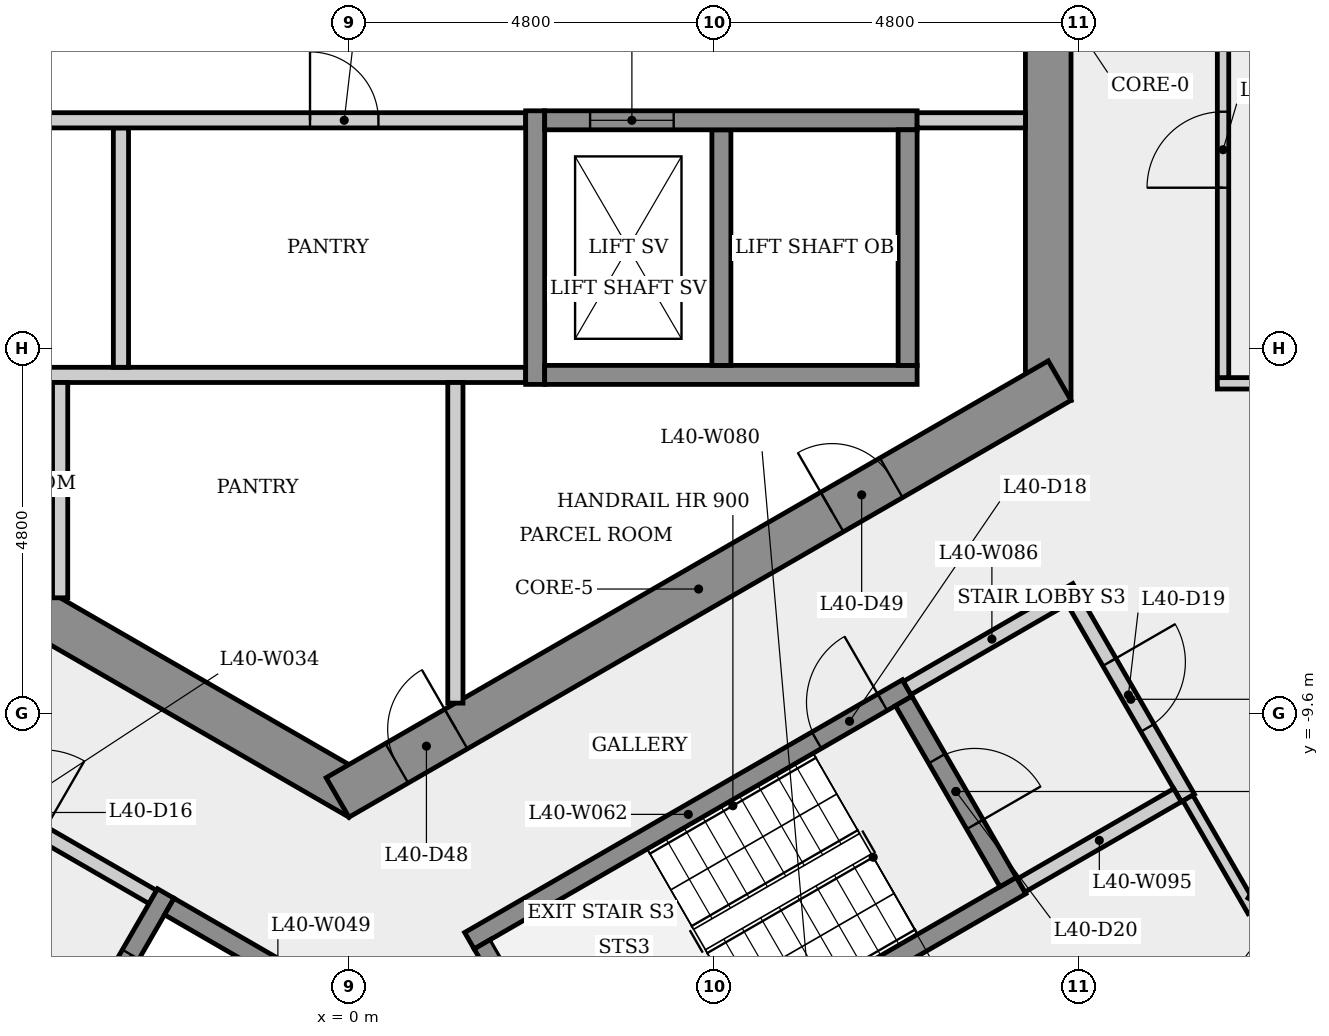
"""IFC4 building model, lengths in metres.
Left out: names, types, materials, properties, quantities, classifications, styles, units other than length and angle.
Written with IfcOpenShell. Run it as: python <this file> out.ifc"""

import sys

from ifc_helpers import new_model, si_unit, direction, frame, frame_2d, origin, place, context, subcontext, project, spatial, rectangle, extrude, element, fill, save


model = new_model("IFC4")
c1 = context("Model", 3, precision=1e-05, world=origin(), true_north=direction((0.0, 1.0)))
c2 = subcontext(c1, "Body", "Model", "MODEL_VIEW")
j1 = project(units=[si_unit("LENGTHUNIT", "METRE"), si_unit("PLANEANGLEUNIT", "RADIAN")], contexts=[c1])
p1 = place(None, origin())
s1 = spatial("IfcSite", under=j1, at=p1, CompositionType="ELEMENT")
p2 = place(p1, origin())
s2 = spatial("IfcBuilding", under=s1, at=p2, CompositionType="ELEMENT")
p3 = place(p2, frame((0.0, 0.0, 152.7)))
s3 = spatial("IfcBuildingStorey", under=s2, at=p3, CompositionType="ELEMENT", Elevation=152.7)
p4 = place(p3, frame((9.2, -5.485, 0.0), z_axis=(0.0, 0.0, 1.0), x_axis=(0.0, 1.0, 0.0)))
e1 = element("IfcWall", 1, at=p4, inside=s3, PredefinedType="SHEAR", context=c2, shape_type="SweptSolid", body=[
    extrude(rectangle(XDim=10.97, YDim=0.6, at=frame_2d((5.485, 0.0))), origin(), (0.0, 0.0, 1.0), 3.4),
])
p5 = place(p4, frame((4.685, 0.0, 0.0)))
e2 = element("IfcOpeningElement", 2, at=p5, cuts=e1, PredefinedType="OPENING", context=c2, shape_type="SweptSolid", body=[
    extrude(rectangle(XDim=1.6, YDim=2.1, at=frame_2d((0.8, 1.05))), frame((0.0, 0.31, 0.0), z_axis=(0.0, -1.0, 0.0), x_axis=(1.0, 0.0, 0.0)), (0.0, 0.0, 1.0), 0.62),
])
p6 = place(p3, frame((-9.35, -5.225, 0.0), z_axis=(0.0, 0.0, 1.0), x_axis=(0.866023993627, -0.500002442456, 0.0)))
e3 = element("IfcWall", 3, at=p6, inside=s3, PredefinedType="SHEAR", context=c2, shape_type="SweptSolid", body=[
    extrude(rectangle(XDim=10.97, YDim=0.6, at=frame_2d((5.485, 0.0))), origin(), (0.0, 0.0, 1.0), 3.4),
])
p7 = place(p6, frame((2.853, 0.0, 0.0)))
e4 = element("IfcOpeningElement", 4, at=p7, cuts=e3, PredefinedType="OPENING", context=c2, shape_type="SweptSolid", body=[
    extrude(rectangle(XDim=0.9, YDim=2.1, at=frame_2d((0.45, 1.05))), frame((0.0, 0.31, 0.0), z_axis=(0.0, -1.0, 0.0), x_axis=(1.0, 0.0, 0.0)), (0.0, 0.0, 1.0), 0.62),
])
p8 = place(p3, frame((-0.15, -10.71, 0.0), z_axis=(0.0, 0.0, 1.0), x_axis=(0.866023993627, 0.500002442456, 0.0)))
e5 = element("IfcWall", 5, at=p8, inside=s3, PredefinedType="SHEAR", context=c2, shape_type="SweptSolid", body=[
    extrude(rectangle(XDim=10.97, YDim=0.6, at=frame_2d((5.485, 0.0))), origin(), (0.0, 0.0, 1.0), 3.4),
])
p9 = place(p8, frame((0.9, 0.0, 0.0)))
e6 = element("IfcOpeningElement", 6, at=p9, cuts=e5, PredefinedType="OPENING", context=c2, shape_type="SweptSolid", body=[
    extrude(rectangle(XDim=0.9, YDim=2.1, at=frame_2d((0.45, 1.05))), frame((0.0, 0.31, 0.0), z_axis=(0.0, -1.0, 0.0), x_axis=(1.0, 0.0, 0.0)), (0.0, 0.0, 1.0), 0.62),
])
p10 = place(p8, frame((7.512, 0.0, 0.0)))
e7 = element("IfcOpeningElement", 7, at=p10, cuts=e5, PredefinedType="OPENING", context=c2, shape_type="SweptSolid", body=[
    extrude(rectangle(XDim=0.9, YDim=2.1, at=frame_2d((0.45, 1.05))), frame((0.0, 0.31, 0.0), z_axis=(0.0, -1.0, 0.0), x_axis=(1.0, 0.0, 0.0)), (0.0, 0.0, 1.0), 0.62),
])
p11 = place(p3, frame((-8.88, -5.15, 0.0), z_axis=(0.0, 0.0, 1.0), x_axis=(1.0, 0.0, 0.0)))
e8 = element("IfcWall", 8, at=p11, inside=s3, PredefinedType="PARTITIONING", context=c2, shape_type="SweptSolid", body=[
    extrude(rectangle(XDim=11.205, YDim=0.2, at=frame_2d((5.603, 0.0))), origin(), (0.0, 0.0, 1.0), 3.05),
])
p12 = place(p3, frame((-6.435, -9.795, 0.0), z_axis=(0.0, 0.0, 1.0), x_axis=(0.866012907634, -0.500021643343, 0.0)))
e9 = element("IfcWall", 9, at=p12, inside=s3, PredefinedType="PARTITIONING", context=c2, shape_type="SweptSolid", body=[
    extrude(rectangle(XDim=4.45, YDim=0.2, at=frame_2d((2.225, 0.0))), origin(), (0.0, 0.0, 1.0), 3.05),
])
p13 = place(p12, frame((1.675, 0.0, 0.0)))
e10 = element("IfcOpeningElement", 10, at=p13, cuts=e9, PredefinedType="OPENING", context=c2, shape_type="SweptSolid", body=[
    extrude(rectangle(XDim=1.1, YDim=2.1, at=frame_2d((0.55, 1.05))), frame((0.0, 0.11, 0.0), z_axis=(0.0, -1.0, 0.0), x_axis=(1.0, 0.0, 0.0)), (0.0, 0.0, 1.0), 0.22),
])
p14 = place(p3, frame((-3.8, -5.25, 0.0), z_axis=(0.0, 0.0, 1.0), x_axis=(0.0, -1.0, 0.0)))
e11 = element("IfcWall", 11, at=p14, inside=s3, PredefinedType="PARTITIONING", context=c2, shape_type="SweptSolid", body=[
    extrude(rectangle(XDim=2.833, YDim=0.2, at=frame_2d((1.417, 0.0))), origin(), (0.0, 0.0, 1.0), 3.05),
])
p15 = place(p3, frame((-3.0, -1.9, 0.0), z_axis=(0.0, 0.0, 1.0), x_axis=(0.0, -1.0, 0.0)))
e12 = element("IfcWall", 12, at=p15, inside=s3, PredefinedType="PARTITIONING", context=c2, shape_type="SweptSolid", body=[
    extrude(rectangle(XDim=3.15, YDim=0.2, at=frame_2d((1.575, 0.0))), origin(), (0.0, 0.0, 1.0), 3.05),
])
p16 = place(p3, frame((-8.9, -1.8, 0.0), z_axis=(0.0, 0.0, 1.0), x_axis=(1.0, 0.0, 0.0)))
e13 = element("IfcWall", 13, at=p16, inside=s3, PredefinedType="PARTITIONING", context=c2, shape_type="SweptSolid", body=[
    extrude(rectangle(XDim=11.225, YDim=0.2, at=frame_2d((5.613, 0.0))), origin(), (0.0, 0.0, 1.0), 3.05),
])
p17 = place(p16, frame((2.485, 0.0, 0.0)))
e14 = element("IfcOpeningElement", 14, at=p17, cuts=e13, PredefinedType="OPENING", context=c2, shape_type="SweptSolid", body=[
    extrude(rectangle(XDim=0.9, YDim=2.1, at=frame_2d((0.45, 1.05))), frame((0.0, 0.11, 0.0), z_axis=(0.0, -1.0, 0.0), x_axis=(1.0, 0.0, 0.0)), (0.0, 0.0, 1.0), 0.22),
])
p18 = place(p16, frame((8.387, 0.0, 0.0)))
e15 = element("IfcOpeningElement", 15, at=p18, cuts=e13, PredefinedType="OPENING", context=c2, shape_type="SweptSolid", body=[
    extrude(rectangle(XDim=0.9, YDim=2.1, at=frame_2d((0.45, 1.05))), frame((0.0, 0.11, 0.0), z_axis=(0.0, -1.0, 0.0), x_axis=(1.0, 0.0, 0.0)), (0.0, 0.0, 1.0), 0.22),
])
p19 = place(p3, frame((-2.41, -11.974, 0.0), z_axis=(0.0, 0.0, 1.0), x_axis=(-0.500001826776, -0.866024349092, 0.0)))
e16 = element("IfcWall", 16, at=p19, inside=s3, PredefinedType="SHEAR", context=c2, shape_type="SweptSolid", body=[
    extrude(rectangle(XDim=2.95, YDim=0.25, at=frame_2d((1.475, 0.0))), origin(), (0.0, 0.0, 1.0), 3.05),
])
p20 = place(p19, frame((0.925, 0.0, 0.0)))
e17 = element("IfcOpeningElement", 17, at=p20, cuts=e16, PredefinedType="OPENING", context=c2, shape_type="SweptSolid", body=[
    extrude(rectangle(XDim=1.1, YDim=2.1, at=frame_2d((0.55, 1.05))), frame((0.0, 0.135, 0.0), z_axis=(0.0, -1.0, 0.0), x_axis=(1.0, 0.0, 0.0)), (0.0, 0.0, 1.0), 0.27),
])
p21 = place(p3, frame((-2.364, -12.145, 0.0), z_axis=(0.0, 0.0, 1.0), x_axis=(0.866040211805, -0.499974350878, 0.0)))
e18 = element("IfcWall", 18, at=p21, inside=s3, PredefinedType="SHEAR", context=c2, shape_type="SweptSolid", body=[
    extrude(rectangle(XDim=3.3, YDim=0.25, at=frame_2d((1.65, 0.0))), origin(), (0.0, 0.0, 1.0), 3.05),
])
p22 = place(p3, frame((1.4, -5.25, 0.0), z_axis=(0.0, 0.0, 1.0), x_axis=(0.0, -1.0, 0.0)))
e19 = element("IfcWall", 19, at=p22, inside=s3, PredefinedType="PARTITIONING", context=c2, shape_type="SweptSolid", body=[
    extrude(rectangle(XDim=4.219, YDim=0.2, at=frame_2d((2.109, 0.0))), origin(), (0.0, 0.0, 1.0), 3.05),
])
p23 = place(p3, frame((1.585, -12.595, 0.0), z_axis=(0.0, 0.0, 1.0), x_axis=(0.866036417653, 0.499980922934, 0.0)))
e20 = element("IfcWall", 20, at=p23, inside=s3, PredefinedType="SHEAR", context=c2, shape_type="SweptSolid", body=[
    extrude(rectangle(XDim=6.65, YDim=0.25, at=frame_2d((3.325, 0.0))), origin(), (0.0, 0.0, 1.0), 3.05),
])
p24 = place(p23, frame((5.275, 0.0, 0.0)))
e21 = element("IfcOpeningElement", 21, at=p24, cuts=e20, PredefinedType="OPENING", context=c2, shape_type="SweptSolid", body=[
    extrude(rectangle(XDim=1.0, YDim=2.1, at=frame_2d((0.5, 1.05))), frame((0.0, 0.135, 0.0), z_axis=(0.0, -1.0, 0.0), x_axis=(1.0, 0.0, 0.0)), (0.0, 0.0, 1.0), 0.27),
])
p25 = place(p3, frame((2.45, -5.275, 0.0), z_axis=(0.0, 0.0, 1.0), x_axis=(0.0, 1.0, 0.0)))
e22 = element("IfcWall", 22, at=p25, inside=s3, PredefinedType="SHEAR", context=c2, shape_type="SweptSolid", body=[
    extrude(rectangle(XDim=3.6, YDim=0.25, at=frame_2d((1.8, 0.0))), origin(), (0.0, 0.0, 1.0), 3.05),
])
p26 = place(p3, frame((3.256, -15.239, 0.0), z_axis=(0.0, 0.0, 1.0), x_axis=(-0.50002537861, 0.866010750942, 0.0)))
e23 = element("IfcWall", 23, at=p26, inside=s3, PredefinedType="SHEAR", context=c2, shape_type="SweptSolid", body=[
    extrude(rectangle(XDim=3.0, YDim=0.25, at=frame_2d((1.5, 0.0))), origin(), (0.0, 0.0, 1.0), 3.05),
])
p27 = place(p3, frame((2.575, -5.15, 0.0), z_axis=(0.0, 0.0, 1.0), x_axis=(1.0, 0.0, 0.0)))
e24 = element("IfcWall", 24, at=p27, inside=s3, PredefinedType="SHEAR", context=c2, shape_type="SweptSolid", body=[
    extrude(rectangle(XDim=4.9, YDim=0.25, at=frame_2d((2.45, 0.0))), origin(), (0.0, 0.0, 1.0), 3.05),
])
p28 = place(p3, frame((4.9, -1.925, 0.0), z_axis=(0.0, 0.0, 1.0), x_axis=(0.0, -1.0, 0.0)))
e25 = element("IfcWall", 25, at=p28, inside=s3, PredefinedType="SHEAR", context=c2, shape_type="SweptSolid", body=[
    extrude(rectangle(XDim=3.1, YDim=0.25, at=frame_2d((1.55, 0.0))), origin(), (0.0, 0.0, 1.0), 3.4),
])
p29 = place(p3, frame((2.575, -1.8, 0.0), z_axis=(0.0, 0.0, 1.0), x_axis=(1.0, 0.0, 0.0)))
e26 = element("IfcWall", 26, at=p29, inside=s3, PredefinedType="SHEAR", context=c2, shape_type="SweptSolid", body=[
    extrude(rectangle(XDim=4.9, YDim=0.25, at=frame_2d((2.45, 0.0))), origin(), (0.0, 0.0, 1.0), 3.05),
])
p30 = place(p29, frame((0.597, 0.0, 0.0)))
e27 = element("IfcOpeningElement", 27, at=p30, cuts=e26, PredefinedType="OPENING", context=c2, shape_type="SweptSolid", body=[
    extrude(rectangle(XDim=1.1, YDim=2.1, at=frame_2d((0.55, 1.05))), frame((0.0, 0.135, 0.0), z_axis=(0.0, -1.0, 0.0), x_axis=(1.0, 0.0, 0.0)), (0.0, 0.0, 1.0), 0.27),
])
p31 = place(p3, frame((3.301, -15.068, 0.0), z_axis=(0.0, 0.0, 1.0), x_axis=(0.866035036182, 0.499983315828, 0.0)))
e28 = element("IfcWall", 28, at=p31, inside=s3, PredefinedType="SHEAR", context=c2, shape_type="SweptSolid", body=[
    extrude(rectangle(XDim=6.4, YDim=0.25, at=frame_2d((3.2, 0.0))), origin(), (0.0, 0.0, 1.0), 3.05),
])
p32 = place(p3, frame((7.298, -9.441, 0.0), z_axis=(0.0, 0.0, 1.0), x_axis=(0.500034990121, -0.866005201286, 0.0)))
e29 = element("IfcWall", 29, at=p32, inside=s3, PredefinedType="SHEAR", context=c2, shape_type="SweptSolid", body=[
    extrude(rectangle(XDim=2.75, YDim=0.25, at=frame_2d((1.375, 0.0))), origin(), (0.0, 0.0, 1.0), 3.05),
])
p33 = place(p32, frame((0.875, 0.0, 0.0)))
e30 = element("IfcOpeningElement", 30, at=p33, cuts=e29, PredefinedType="OPENING", context=c2, shape_type="SweptSolid", body=[
    extrude(rectangle(XDim=1.0, YDim=2.1, at=frame_2d((0.5, 1.05))), frame((0.0, 0.135, 0.0), z_axis=(0.0, -1.0, 0.0), x_axis=(1.0, 0.0, 0.0)), (0.0, 0.0, 1.0), 0.27),
])
p34 = place(p3, frame((7.344, -9.27, 0.0), z_axis=(0.0, 0.0, 1.0), x_axis=(0.866005588531, 0.500034319456, 0.0)))
e31 = element("IfcWall", 31, at=p34, inside=s3, PredefinedType="PARTITIONING", context=c2, shape_type="SweptSolid", body=[
    extrude(rectangle(XDim=2.575, YDim=0.2, at=frame_2d((1.288, 0.0))), origin(), (0.0, 0.0, 1.0), 3.05),
])
p35 = place(p3, frame((7.35, -1.925, 0.0), z_axis=(0.0, 0.0, 1.0), x_axis=(0.0, -1.0, 0.0)))
e32 = element("IfcWall", 32, at=p35, inside=s3, PredefinedType="SHEAR", context=c2, shape_type="SweptSolid", body=[
    extrude(rectangle(XDim=3.1, YDim=0.25, at=frame_2d((1.55, 0.0))), origin(), (0.0, 0.0, 1.0), 3.4),
])
p36 = place(p3, frame((8.9, -1.8, 0.0), z_axis=(0.0, 0.0, 1.0), x_axis=(-1.0, 0.0, 0.0)))
e33 = element("IfcWall", 33, at=p36, inside=s3, PredefinedType="PARTITIONING", context=c2, shape_type="SweptSolid", body=[
    extrude(rectangle(XDim=1.425, YDim=0.2, at=frame_2d((0.712, 0.0))), origin(), (0.0, 0.0, 1.0), 3.05),
])
p37 = place(p3, frame((9.537, -8.119, 0.0), z_axis=(0.0, 0.0, 1.0), x_axis=(0.499990139034, -0.866031096941, 0.0)))
e34 = element("IfcWall", 34, at=p37, inside=s3, PredefinedType="PARTITIONING", context=c2, shape_type="SweptSolid", body=[
    extrude(rectangle(XDim=3.0, YDim=0.2, at=frame_2d((1.5, 0.0))), origin(), (0.0, 0.0, 1.0), 3.05),
])
p38 = place(p37, frame((0.935, 0.0, 0.0)))
e35 = element("IfcOpeningElement", 35, at=p38, cuts=e34, PredefinedType="OPENING", context=c2, shape_type="SweptSolid", body=[
    extrude(rectangle(XDim=1.0, YDim=2.1, at=frame_2d((0.5, 1.05))), frame((0.0, 0.11, 0.0), z_axis=(0.0, -1.0, 0.0), x_axis=(1.0, 0.0, 0.0)), (0.0, 0.0, 1.0), 0.22),
])
p39 = place(p3, frame((10.901, -10.681, 0.0), z_axis=(0.0, 0.0, 1.0), x_axis=(-0.866007538022, -0.500030943131, 0.0)))
e36 = element("IfcWall", 36, at=p39, inside=s3, PredefinedType="PARTITIONING", context=c2, shape_type="SweptSolid", body=[
    extrude(rectangle(XDim=2.375, YDim=0.2, at=frame_2d((1.188, 0.0))), origin(), (0.0, 0.0, 1.0), 3.05),
])
p40 = place(p3, frame((11.425, -5.261, 0.0), z_axis=(0.0, 0.0, 1.0), x_axis=(1.0, 0.0, 0.0)))
e37 = element("IfcWall", 37, at=p40, inside=s3, PredefinedType="PARTITIONING", context=c2, shape_type="SweptSolid", body=[
    extrude(rectangle(XDim=4.476, YDim=0.15, at=frame_2d((2.238, 0.0))), origin(), (0.0, 0.0, 1.0), 3.05),
])
p41 = place(p3, frame((11.5, -5.186, 0.0), z_axis=(0.0, 0.0, 1.0), x_axis=(0.0, 1.0, 0.0)))
e38 = element("IfcWall", 38, at=p41, inside=s3, PredefinedType="PARTITIONING", context=c2, shape_type="SweptSolid", body=[
    extrude(rectangle(XDim=10.521, YDim=0.15, at=frame_2d((5.261, 0.0))), origin(), (0.0, 0.0, 1.0), 3.05),
])
p42 = place(p41, frame((2.499, 0.0, 0.0)))
e39 = element("IfcOpeningElement", 39, at=p42, cuts=e38, PredefinedType="OPENING", context=c2, shape_type="SweptSolid", body=[
    extrude(rectangle(XDim=1.0, YDim=2.1, at=frame_2d((0.5, 1.05))), frame((0.0, 0.085, 0.0), z_axis=(0.0, -1.0, 0.0), x_axis=(1.0, 0.0, 0.0)), (0.0, 0.0, 1.0), 0.17),
])
p43 = place(p41, frame((8.178, 0.0, 0.0)))
e40 = element("IfcOpeningElement", 40, at=p43, cuts=e38, PredefinedType="OPENING", context=c2, shape_type="SweptSolid", body=[
    extrude(rectangle(XDim=1.0, YDim=2.1, at=frame_2d((0.5, 1.05))), frame((0.0, 0.085, 0.0), z_axis=(0.0, -1.0, 0.0), x_axis=(1.0, 0.0, 0.0)), (0.0, 0.0, 1.0), 0.17),
])
p44 = place(p3, frame((11.894, -12.201, 0.0), z_axis=(0.0, 0.0, 1.0), x_axis=(-0.499878701538, 0.866095424159, 0.0)))
e41 = element("IfcWall", 41, at=p44, inside=s3, PredefinedType="PARTITIONING", context=c2, shape_type="SweptSolid", body=[
    extrude(rectangle(XDim=1.713, YDim=0.15, at=frame_2d((0.857, 0.0))), origin(), (0.0, 0.0, 1.0), 3.05),
])
p45 = place(p3, frame((12.966, -14.058, 0.0), z_axis=(0.0, 0.0, 1.0), x_axis=(-0.500057540742, 0.865992180073, 0.0)))
e42 = element("IfcWall", 42, at=p45, inside=s3, PredefinedType="PARTITIONING", context=c2, shape_type="SweptSolid", body=[
    extrude(rectangle(XDim=2.144, YDim=0.1, at=frame_2d((1.072, 0.0))), origin(), (0.0, 0.0, 1.0), 3.05),
])
p46 = place(p45, frame((0.858, 0.0, 0.0)))
e43 = element("IfcOpeningElement", 43, at=p46, cuts=e42, PredefinedType="OPENING", context=c2, shape_type="SweptSolid", body=[
    extrude(rectangle(XDim=0.9, YDim=2.1, at=frame_2d((0.45, 1.05))), frame((0.0, 0.06, 0.0), z_axis=(0.0, -1.0, 0.0), x_axis=(1.0, 0.0, 0.0)), (0.0, 0.0, 1.0), 0.12),
])
p47 = place(p3, frame((15.788, -5.326, 0.0), z_axis=(0.0, 0.0, 1.0), x_axis=(-0.500022727545, -0.866012281633, 0.0)))
e44 = element("IfcWall", 44, at=p47, inside=s3, PredefinedType="PARTITIONING", context=c2, shape_type="SweptSolid", body=[
    extrude(rectangle(XDim=7.789, YDim=0.15, at=frame_2d((3.895, 0.0))), origin(), (0.0, 0.0, 1.0), 3.05),
])
p48 = place(p47, frame((3.394, 0.0, 0.0)))
e45 = element("IfcOpeningElement", 45, at=p48, cuts=e44, PredefinedType="OPENING", context=c2, shape_type="SweptSolid", body=[
    extrude(rectangle(XDim=1.0, YDim=2.1, at=frame_2d((0.5, 1.05))), frame((0.0, 0.085, 0.0), z_axis=(0.0, -1.0, 0.0), x_axis=(1.0, 0.0, 0.0)), (0.0, 0.0, 1.0), 0.17),
])
p49 = place(p30, origin())
e46 = element("IfcDoor", 46, at=p49, inside=s3, OperationType="SLIDING_TO_LEFT", PredefinedType="DOOR", context=c2, shape_type="SweptSolid", body=[
    extrude(rectangle(XDim=1.1, YDim=2.1, at=frame_2d((0.55, 1.05))), frame((0.0, 0.025, 0.0), z_axis=(0.0, -1.0, 0.0), x_axis=(1.0, 0.0, 0.0)), (0.0, 0.0, 1.0), 0.05),
])
fill(e27, e46)
p50 = place(p18, origin())
e47 = element("IfcDoor", 47, at=p50, inside=s3, OperationType="SINGLE_SWING_LEFT", PredefinedType="DOOR", context=c2, shape_type="SweptSolid", body=[
    extrude(rectangle(XDim=0.9, YDim=2.1, at=frame_2d((0.45, 1.05))), frame((0.0, 0.025, 0.0), z_axis=(0.0, -1.0, 0.0), x_axis=(1.0, 0.0, 0.0)), (0.0, 0.0, 1.0), 0.05),
])
fill(e15, e47)
p51 = place(p20, origin())
e48 = element("IfcDoor", 48, at=p51, inside=s3, OperationType="SLIDING_TO_LEFT", PredefinedType="DOOR", context=c2, shape_type="SweptSolid", body=[
    extrude(rectangle(XDim=1.1, YDim=2.1, at=frame_2d((0.55, 1.05))), frame((0.0, 0.025, 0.0), z_axis=(0.0, -1.0, 0.0), x_axis=(1.0, 0.0, 0.0)), (0.0, 0.0, 1.0), 0.05),
])
fill(e17, e48)
p52 = place(p24, origin())
e49 = element("IfcDoor", 49, at=p52, inside=s3, OperationType="SINGLE_SWING_RIGHT", PredefinedType="DOOR", context=c2, shape_type="SweptSolid", body=[
    extrude(rectangle(XDim=1.0, YDim=2.1, at=frame_2d((0.5, 1.05))), frame((0.0, 0.025, 0.0), z_axis=(0.0, -1.0, 0.0), x_axis=(1.0, 0.0, 0.0)), (0.0, 0.0, 1.0), 0.05),
])
fill(e21, e49)
p53 = place(p38, origin())
e50 = element("IfcDoor", 50, at=p53, inside=s3, OperationType="SINGLE_SWING_LEFT", PredefinedType="DOOR", context=c2, shape_type="SweptSolid", body=[
    extrude(rectangle(XDim=1.0, YDim=2.1, at=frame_2d((0.5, 1.05))), frame((0.0, 0.025, 0.0), z_axis=(0.0, -1.0, 0.0), x_axis=(1.0, 0.0, 0.0)), (0.0, 0.0, 1.0), 0.05),
])
fill(e35, e50)
p54 = place(p33, origin())
e51 = element("IfcDoor", 51, at=p54, inside=s3, OperationType="SINGLE_SWING_RIGHT", PredefinedType="DOOR", context=c2, shape_type="SweptSolid", body=[
    extrude(rectangle(XDim=1.0, YDim=2.1, at=frame_2d((0.5, 1.05))), frame((0.0, 0.025, 0.0), z_axis=(0.0, -1.0, 0.0), x_axis=(1.0, 0.0, 0.0)), (0.0, 0.0, 1.0), 0.05),
])
fill(e30, e51)
p55 = place(p42, origin())
e52 = element("IfcDoor", 52, at=p55, inside=s3, OperationType="SINGLE_SWING_LEFT", PredefinedType="DOOR", context=c2, shape_type="SweptSolid", body=[
    extrude(rectangle(XDim=1.0, YDim=2.1, at=frame_2d((0.5, 1.05))), frame((0.0, 0.025, 0.0), z_axis=(0.0, -1.0, 0.0), x_axis=(1.0, 0.0, 0.0)), (0.0, 0.0, 1.0), 0.05),
])
fill(e39, e52)
p56 = place(p9, origin())
e53 = element("IfcDoor", 53, at=p56, inside=s3, OperationType="SINGLE_SWING_RIGHT", PredefinedType="DOOR", context=c2, shape_type="SweptSolid", body=[
    extrude(rectangle(XDim=0.9, YDim=2.1, at=frame_2d((0.45, 1.05))), frame((0.0, 0.025, 0.0), z_axis=(0.0, -1.0, 0.0), x_axis=(1.0, 0.0, 0.0)), (0.0, 0.0, 1.0), 0.05),
])
fill(e6, e53)
p57 = place(p10, origin())
e54 = element("IfcDoor", 54, at=p57, inside=s3, OperationType="SINGLE_SWING_LEFT", PredefinedType="DOOR", context=c2, shape_type="SweptSolid", body=[
    extrude(rectangle(XDim=0.9, YDim=2.1, at=frame_2d((0.45, 1.05))), frame((0.0, 0.025, 0.0), z_axis=(0.0, -1.0, 0.0), x_axis=(1.0, 0.0, 0.0)), (0.0, 0.0, 1.0), 0.05),
])
fill(e7, e54)
save(model, sys.argv[1])
